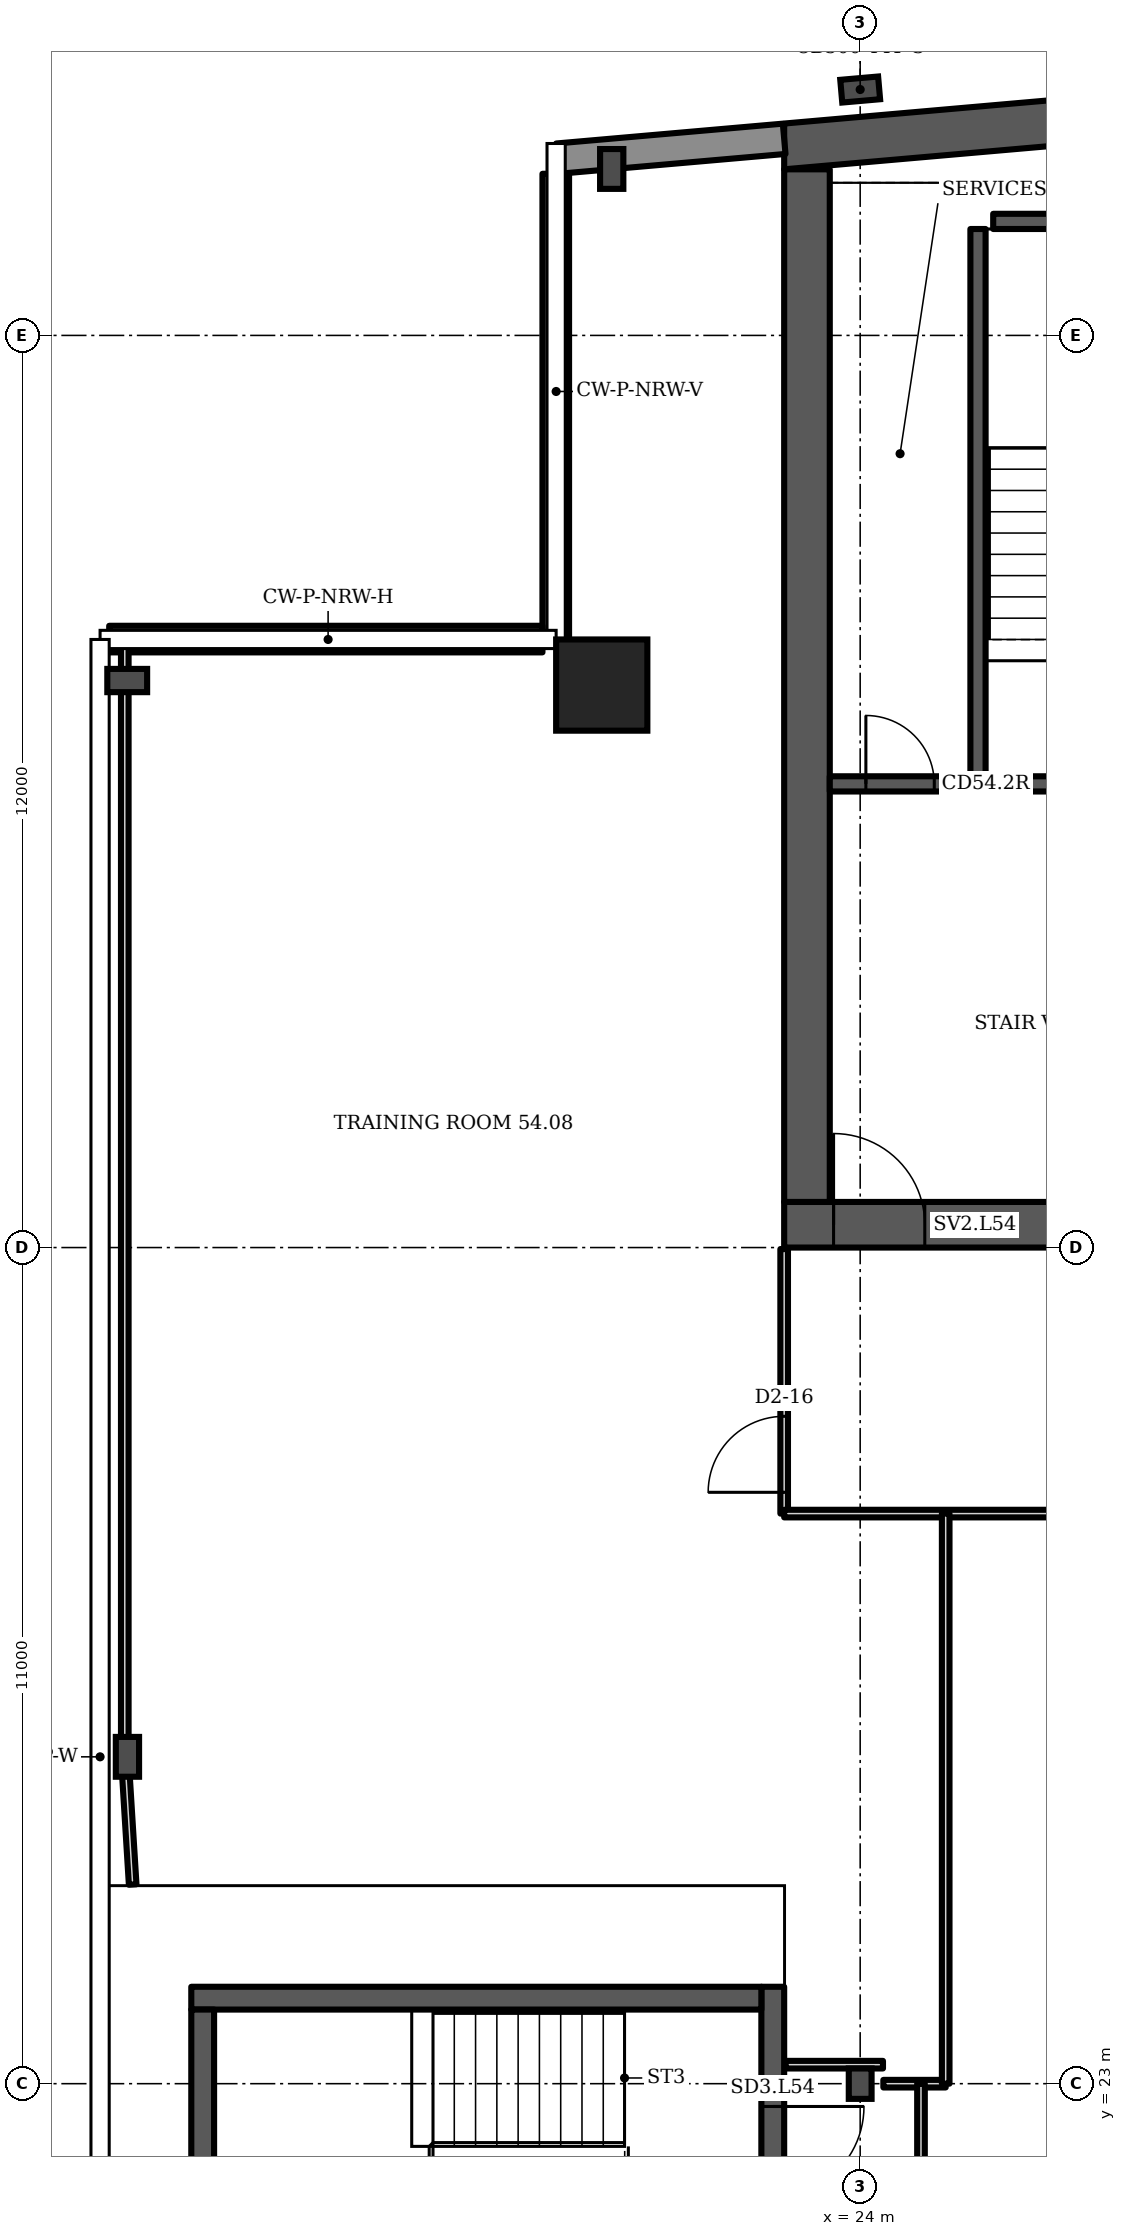
"""IFC4 building model, lengths in metres.
Left out: names, types, materials, properties, quantities, classifications, styles, units other than length and angle.
Written with IfcOpenShell. Run it as: python <this file> out.ifc"""

import sys

from ifc_helpers import new_model, si_unit, direction, frame, frame_2d, origin, origin_2d, place, context, subcontext, project, spatial, polyline, rectangle, i_section, outline, extrude, element, fill, save


model = new_model("IFC4")
c1 = context("Model", 3, precision=1e-05, world=origin(), true_north=direction((0.0, 1.0)))
c2 = subcontext(c1, "Body", "Model", "MODEL_VIEW")
j1 = project(units=[si_unit("LENGTHUNIT", "METRE"), si_unit("PLANEANGLEUNIT", "RADIAN")], contexts=[c1])
p1 = place(None, origin())
s1 = spatial("IfcSite", under=j1, at=p1, CompositionType="ELEMENT")
p2 = place(p1, origin())
s2 = spatial("IfcBuilding", under=s1, at=p2, CompositionType="ELEMENT")
p3 = place(p2, frame((0.0, 0.0, 217.9)))
s3 = spatial("IfcBuildingStorey", under=s2, at=p3, CompositionType="ELEMENT", Elevation=217.9)
p4 = place(p3, origin())
e1 = element("IfcWall", 1, at=p4, inside=s3, PredefinedType="SHEAR", context=c2, shape_type="SweptSolid", body=[
    extrude(outline(polyline([(23.0, 48.185), (40.5, 49.716), (58.0, 48.185), (58.0, 48.787), (40.5, 50.318), (23.0, 48.787), (23.0, 48.185)])), origin(), (0.0, 0.0, 1.0), 3.6),
])
p5 = place(p3, frame((23.0, 34.3, 0.0), z_axis=(0.0, 0.0, 1.0), x_axis=(1.0, 0.0, 0.0)))
e2 = element("IfcWall", 2, at=p5, inside=s3, PredefinedType="SHEAR", context=c2, shape_type="SweptSolid", body=[
    extrude(rectangle(XDim=35.0, YDim=0.6, at=frame_2d((17.5, 0.0))), origin(), (0.0, 0.0, 1.0), 3.6),
])
p6 = place(p5, frame((0.65, 0.0, 0.0)))
e3 = element("IfcOpeningElement", 3, at=p6, cuts=e2, PredefinedType="OPENING", context=c2, shape_type="SweptSolid", body=[
    extrude(rectangle(XDim=1.2, YDim=2.1, at=frame_2d((0.6, 1.05))), frame((0.0, 0.31, 0.0), z_axis=(0.0, -1.0, 0.0), x_axis=(1.0, 0.0, 0.0)), (0.0, 0.0, 1.0), 0.62),
])
p7 = place(p5, frame((7.717, 0.0, 0.0)))
e4 = element("IfcOpeningElement", 4, at=p7, cuts=e2, PredefinedType="OPENING", context=c2, shape_type="SweptSolid", body=[
    extrude(rectangle(XDim=1.1, YDim=2.1, at=frame_2d((0.55, 1.05))), frame((0.0, 0.31, 0.0), z_axis=(0.0, -1.0, 0.0), x_axis=(1.0, 0.0, 0.0)), (0.0, 0.0, 1.0), 0.62),
])
p8 = place(p5, frame((12.183, 0.0, 0.0)))
e5 = element("IfcOpeningElement", 5, at=p8, cuts=e2, PredefinedType="OPENING", context=c2, shape_type="SweptSolid", body=[
    extrude(rectangle(XDim=1.1, YDim=2.1, at=frame_2d((0.55, 1.05))), frame((0.0, 0.31, 0.0), z_axis=(0.0, -1.0, 0.0), x_axis=(1.0, 0.0, 0.0)), (0.0, 0.0, 1.0), 0.62),
])
p9 = place(p5, frame((9.8, 0.0, 0.0)))
e6 = element("IfcOpeningElement", 6, at=p9, cuts=e2, PredefinedType="OPENING", context=c2, shape_type="SweptSolid", body=[
    extrude(rectangle(XDim=1.4, YDim=2.1, at=frame_2d((0.7, 1.05))), frame((0.0, 0.31, 0.0), z_axis=(0.0, -1.0, 0.0), x_axis=(1.0, 0.0, 0.0)), (0.0, 0.0, 1.0), 0.62),
])
p10 = place(p5, frame((14.717, 0.0, 0.0)))
e7 = element("IfcOpeningElement", 7, at=p10, cuts=e2, PredefinedType="OPENING", context=c2, shape_type="SweptSolid", body=[
    extrude(rectangle(XDim=1.1, YDim=2.1, at=frame_2d((0.55, 1.05))), frame((0.0, 0.31, 0.0), z_axis=(0.0, -1.0, 0.0), x_axis=(1.0, 0.0, 0.0)), (0.0, 0.0, 1.0), 0.62),
])
p11 = place(p5, frame((16.95, 0.0, 0.0)))
e8 = element("IfcOpeningElement", 8, at=p11, cuts=e2, PredefinedType="OPENING", context=c2, shape_type="SweptSolid", body=[
    extrude(rectangle(XDim=1.1, YDim=2.1, at=frame_2d((0.55, 1.05))), frame((0.0, 0.31, 0.0), z_axis=(0.0, -1.0, 0.0), x_axis=(1.0, 0.0, 0.0)), (0.0, 0.0, 1.0), 0.62),
])
p12 = place(p5, frame((19.183, 0.0, 0.0)))
e9 = element("IfcOpeningElement", 9, at=p12, cuts=e2, PredefinedType="OPENING", context=c2, shape_type="SweptSolid", body=[
    extrude(rectangle(XDim=1.1, YDim=2.1, at=frame_2d((0.55, 1.05))), frame((0.0, 0.31, 0.0), z_axis=(0.0, -1.0, 0.0), x_axis=(1.0, 0.0, 0.0)), (0.0, 0.0, 1.0), 0.62),
])
p13 = place(p5, frame((26.15, 0.0, 0.0)))
e10 = element("IfcOpeningElement", 10, at=p13, cuts=e2, PredefinedType="OPENING", context=c2, shape_type="SweptSolid", body=[
    extrude(rectangle(XDim=1.2, YDim=2.1, at=frame_2d((0.6, 1.05))), frame((0.0, 0.31, 0.0), z_axis=(0.0, -1.0, 0.0), x_axis=(1.0, 0.0, 0.0)), (0.0, 0.0, 1.0), 0.62),
])
p14 = place(p5, frame((28.767, 0.0, 0.0)))
e11 = element("IfcOpeningElement", 11, at=p14, cuts=e2, PredefinedType="OPENING", context=c2, shape_type="SweptSolid", body=[
    extrude(rectangle(XDim=1.0, YDim=2.1, at=frame_2d((0.5, 1.05))), frame((0.0, 0.31, 0.0), z_axis=(0.0, -1.0, 0.0), x_axis=(1.0, 0.0, 0.0)), (0.0, 0.0, 1.0), 0.62),
])
p15 = place(p5, frame((33.083, 0.0, 0.0)))
e12 = element("IfcOpeningElement", 12, at=p15, cuts=e2, PredefinedType="OPENING", context=c2, shape_type="SweptSolid", body=[
    extrude(rectangle(XDim=1.0, YDim=2.1, at=frame_2d((0.5, 1.05))), frame((0.0, 0.31, 0.0), z_axis=(0.0, -1.0, 0.0), x_axis=(1.0, 0.0, 0.0)), (0.0, 0.0, 1.0), 0.62),
])
p16 = place(p5, frame((30.8, 0.0, 0.0)))
e13 = element("IfcOpeningElement", 13, at=p16, cuts=e2, PredefinedType="OPENING", context=c2, shape_type="SweptSolid", body=[
    extrude(rectangle(XDim=1.4, YDim=2.1, at=frame_2d((0.7, 1.05))), frame((0.0, 0.31, 0.0), z_axis=(0.0, -1.0, 0.0), x_axis=(1.0, 0.0, 0.0)), (0.0, 0.0, 1.0), 0.62),
])
p17 = place(p3, frame((23.3, 34.6, 0.0), z_axis=(0.0, 0.0, 1.0), x_axis=(0.0, 1.0, 0.0)))
e14 = element("IfcWall", 14, at=p17, inside=s3, PredefinedType="SHEAR", context=c2, shape_type="SweptSolid", body=[
    extrude(rectangle(XDim=13.585, YDim=0.6, at=frame_2d((6.792, 0.0))), origin(), (0.0, 0.0, 1.0), 3.6),
])
p18 = place(p3, frame((20.6, 41.4, 0.0), z_axis=(0.0, 0.0, 1.0), x_axis=(1.0, 0.0, 0.0)))
e15 = element("IfcColumn", 15, at=p18, inside=s3, PredefinedType="COLUMN", context=c2, shape_type="SweptSolid", body=[
    extrude(rectangle(XDim=1.2, YDim=1.2, at=origin_2d()), origin(), (0.0, 0.0, 1.0), 3.6),
])
for number, where, z_axis, x_axis in (
    (16, (20.731, 48.19, 0.0), (0.0, 0.0, 1.0), (-1.0, 0.0, 0.0)),
    (17, (14.357, 41.46, 0.0), (0.0, 0.0, 1.0), (0.0, 1.0, 0.0)),
    (18, (14.36, 27.3, 0.0), (0.0, 0.0, 1.0), (-1.0, 0.0, 0.0)),
):
    element("IfcColumn", number, at=place(p3, frame(where, z_axis=z_axis, x_axis=x_axis)), inside=s3, PredefinedType="COLUMN", context=c2, shape_type="SweptSolid", body=[
        extrude(i_section(OverallWidth=0.306, OverallDepth=0.524, WebThickness=0.021, FlangeThickness=0.04, FilletRadius=0.027, at=origin_2d()), origin(), (0.0, 0.0, 1.0), 3.6),
    ])
p19 = place(p3, frame((24.0, 23.0, 0.0), z_axis=(0.0, 0.0, 1.0), x_axis=(1.0, 0.0, 0.0)))
e19 = element("IfcColumn", 19, at=p19, inside=s3, PredefinedType="COLUMN", context=c2, shape_type="SweptSolid", body=[
    extrude(i_section(OverallWidth=0.3, OverallDepth=0.4, WebThickness=0.013, FlangeThickness=0.024, FilletRadius=0.027, at=origin_2d()), origin(), (0.0, 0.0, 1.0), 3.6),
])
p20 = place(p3, frame((24.0, 49.235, 0.0), z_axis=(0.0, 0.0, 1.0), x_axis=(-0.087156, 0.996197, 0.0)))
e20 = element("IfcColumn", 20, at=p20, inside=s3, PredefinedType="COLUMN", context=c2, shape_type="SweptSolid", body=[
    extrude(i_section(OverallWidth=0.3, OverallDepth=0.5, WebThickness=0.014, FlangeThickness=0.028, FilletRadius=0.027, at=origin_2d()), origin(), (0.0, 0.0, 1.0), 3.6),
])
p21 = place(p3, frame((23.0, 48.587, 0.0), z_axis=(0.0, 0.0, 1.0), x_axis=(-0.996194, -0.087168, 0.0)))
e21 = element("IfcWall", 21, at=p21, inside=s3, PredefinedType="SOLIDWALL", context=c2, shape_type="SweptSolid", body=[
    extrude(rectangle(XDim=2.994, YDim=0.4, at=frame_2d((1.497, 0.0))), origin(), (0.0, 0.0, 1.0), 3.2),
])
p22 = place(p3, frame((19.995, 48.126, 0.0), z_axis=(0.0, 0.0, 1.0), x_axis=(0.0, -1.0, 0.0)))
e22 = element("IfcWall", 22, at=p22, inside=s3, PredefinedType="SOLIDWALL", context=c2, shape_type="SweptSolid", body=[
    extrude(rectangle(XDim=6.126, YDim=0.35, at=frame_2d((3.063, 0.0))), origin(), (0.0, 0.0, 1.0), 1.0),
])
p23 = place(p3, frame((19.82, 42.005, 0.0), z_axis=(0.0, 0.0, 1.0), x_axis=(-1.0, 0.0, 0.0)))
e23 = element("IfcWall", 23, at=p23, inside=s3, PredefinedType="SOLIDWALL", context=c2, shape_type="SweptSolid", body=[
    extrude(rectangle(XDim=5.7, YDim=0.35, at=frame_2d((2.85, 0.0))), origin(), (0.0, 0.0, 1.0), 1.0),
])
p24 = place(p3, frame((23.6, 40.1, 0.0), z_axis=(0.0, 0.0, 1.0), x_axis=(1.0, 0.0, 0.0)))
e24 = element("IfcWall", 24, at=p24, inside=s3, PredefinedType="SHEAR", context=c2, shape_type="SweptSolid", body=[
    extrude(rectangle(XDim=6.1, YDim=0.2, at=frame_2d((3.05, 0.0))), origin(), (0.0, 0.0, 1.0), 3.2),
])
p25 = place(p24, frame((3.325, 0.0, 0.0)))
e25 = element("IfcOpeningElement", 25, at=p25, cuts=e24, PredefinedType="OPENING", context=c2, shape_type="SweptSolid", body=[
    extrude(rectangle(XDim=1.2, YDim=2.1, at=frame_2d((0.6, 1.05))), frame((0.0, 0.11, 0.0), z_axis=(0.0, -1.0, 0.0), x_axis=(1.0, 0.0, 0.0)), (0.0, 0.0, 1.0), 0.22),
])
p26 = place(p24, frame((0.475, 0.0, 0.0)))
e26 = element("IfcOpeningElement", 26, at=p26, cuts=e24, PredefinedType="OPENING", context=c2, shape_type="SweptSolid", body=[
    extrude(rectangle(XDim=0.9, YDim=2.1, at=frame_2d((0.45, 1.05))), frame((0.0, 0.11, 0.0), z_axis=(0.0, -1.0, 0.0), x_axis=(1.0, 0.0, 0.0)), (0.0, 0.0, 1.0), 0.22),
])
p27 = place(p3, frame((25.55, 40.2, 0.0), z_axis=(0.0, 0.0, 1.0), x_axis=(0.0, 1.0, 0.0)))
e27 = element("IfcWall", 27, at=p27, inside=s3, PredefinedType="SHEAR", context=c2, shape_type="SweptSolid", body=[
    extrude(rectangle(XDim=7.2, YDim=0.2, at=frame_2d((3.6, 0.0))), origin(), (0.0, 0.0, 1.0), 3.2),
])
p28 = place(p3, frame((25.75, 47.5, 0.0), z_axis=(0.0, 0.0, 1.0), x_axis=(1.0, 0.0, 0.0)))
e28 = element("IfcWall", 28, at=p28, inside=s3, PredefinedType="SHEAR", context=c2, shape_type="SweptSolid", body=[
    extrude(rectangle(XDim=3.95, YDim=0.2, at=frame_2d((1.975, 0.0))), origin(), (0.0, 0.0, 1.0), 3.2),
])
p29 = place(p3, frame((22.85, 19.925, 0.0), z_axis=(0.0, 0.0, 1.0), x_axis=(0.0, 1.0, 0.0)))
e29 = element("IfcWall", 29, at=p29, inside=s3, PredefinedType="SHEAR", context=c2, shape_type="SweptSolid", body=[
    extrude(rectangle(XDim=4.35, YDim=0.3, at=frame_2d((2.175, 0.0))), origin(), (0.0, 0.0, 1.0), 3.2),
])
p30 = place(p29, frame((1.575, 0.0, 0.0)))
e30 = element("IfcOpeningElement", 30, at=p30, cuts=e29, PredefinedType="OPENING", context=c2, shape_type="SweptSolid", body=[
    extrude(rectangle(XDim=1.2, YDim=2.1, at=frame_2d((0.6, 1.05))), frame((0.0, 0.16, 0.0), z_axis=(0.0, -1.0, 0.0), x_axis=(1.0, 0.0, 0.0)), (0.0, 0.0, 1.0), 0.32),
])
p31 = place(p3, frame((14.325, 27.3, 0.0), z_axis=(0.0, 0.0, 1.0), x_axis=(0.0, 1.0, 0.0)))
e31 = element("IfcWall", 31, at=p31, inside=s3, PredefinedType="PARTITIONING", context=c2, shape_type="SweptSolid", body=[
    extrude(rectangle(XDim=14.68, YDim=0.1, at=frame_2d((7.34, 0.0))), origin(), (0.0, 0.0, 1.0), 2.58),
])
p32 = place(p3, frame((14.429, 25.62, 0.0), z_axis=(0.0, 0.0, 1.0), x_axis=(-0.061647, 0.998101, 0.0)))
e32 = element("IfcWall", 32, at=p32, inside=s3, PredefinedType="PARTITIONING", context=c2, shape_type="SweptSolid", body=[
    extrude(rectangle(XDim=1.683, YDim=0.1, at=frame_2d((0.842, 0.0))), origin(), (0.0, 0.0, 1.0), 3.2),
])
p33 = place(p3, frame((23.0, 30.5, 0.0), z_axis=(0.0, 0.0, 1.0), x_axis=(0.0, 1.0, 0.0)))
e33 = element("IfcWall", 33, at=p33, inside=s3, PredefinedType="PARTITIONING", context=c2, shape_type="SweptSolid", body=[
    extrude(rectangle(XDim=3.48, YDim=0.1, at=frame_2d((1.74, 0.0))), origin(), (0.0, 0.0, 1.0), 3.2),
])
p34 = place(p33, frame((0.28, 0.0, 0.0)))
e34 = element("IfcOpeningElement", 34, at=p34, cuts=e33, PredefinedType="OPENING", context=c2, shape_type="SweptSolid", body=[
    extrude(rectangle(XDim=1.0, YDim=2.1, at=frame_2d((0.5, 1.05))), frame((0.0, 0.06, 0.0), z_axis=(0.0, -1.0, 0.0), x_axis=(1.0, 0.0, 0.0)), (0.0, 0.0, 1.0), 0.12),
])
p35 = place(p3, frame((23.0, 30.5, 0.0), z_axis=(0.0, 0.0, 1.0), x_axis=(1.0, 0.0, 0.0)))
e35 = element("IfcWall", 35, at=p35, inside=s3, PredefinedType="PARTITIONING", context=c2, shape_type="SweptSolid", body=[
    extrude(rectangle(XDim=13.85, YDim=0.1, at=frame_2d((6.925, 0.0))), origin(), (0.0, 0.0, 1.0), 3.2),
])
p36 = place(p35, frame((3.545, 0.0, 0.0)))
e36 = element("IfcOpeningElement", 36, at=p36, cuts=e35, PredefinedType="OPENING", context=c2, shape_type="SweptSolid", body=[
    extrude(rectangle(XDim=1.0, YDim=2.1, at=frame_2d((0.5, 1.05))), frame((0.0, 0.06, 0.0), z_axis=(0.0, -1.0, 0.0), x_axis=(1.0, 0.0, 0.0)), (0.0, 0.0, 1.0), 0.12),
])
p37 = place(p35, frame((11.545, 0.0, 0.0)))
e37 = element("IfcOpeningElement", 37, at=p37, cuts=e35, PredefinedType="OPENING", context=c2, shape_type="SweptSolid", body=[
    extrude(rectangle(XDim=1.0, YDim=2.1, at=frame_2d((0.5, 1.05))), frame((0.0, 0.06, 0.0), z_axis=(0.0, -1.0, 0.0), x_axis=(1.0, 0.0, 0.0)), (0.0, 0.0, 1.0), 0.12),
])
p38 = place(p3, frame((23.02, 23.25, 0.0), z_axis=(0.0, 0.0, 1.0), x_axis=(1.0, 0.0, 0.0)))
e38 = element("IfcWall", 38, at=p38, inside=s3, PredefinedType="PARTITIONING", context=c2, shape_type="SweptSolid", body=[
    extrude(rectangle(XDim=1.28, YDim=0.1, at=frame_2d((0.64, 0.0))), origin(), (0.0, 0.0, 1.0), 3.2),
])
p39 = place(p3, frame((24.305, 23.0, 0.0), z_axis=(0.0, 0.0, 1.0), x_axis=(1.0, 0.0, 0.0)))
e39 = element("IfcWall", 39, at=p39, inside=s3, PredefinedType="PARTITIONING", context=c2, shape_type="SweptSolid", body=[
    extrude(rectangle(XDim=0.82, YDim=0.1, at=frame_2d((0.41, 0.0))), origin(), (0.0, 0.0, 1.0), 3.2),
])
p40 = place(p3, frame((24.8, 19.2, 0.0), z_axis=(0.0, 0.0, 1.0), x_axis=(0.0, 1.0, 0.0)))
e40 = element("IfcWall", 40, at=p40, inside=s3, PredefinedType="PARTITIONING", context=c2, shape_type="SweptSolid", body=[
    extrude(rectangle(XDim=3.8, YDim=0.1, at=frame_2d((1.9, 0.0))), origin(), (0.0, 0.0, 1.0), 3.2),
])
p41 = place(p3, frame((25.125, 23.0, 0.0), z_axis=(0.0, 0.0, 1.0), x_axis=(0.0, 1.0, 0.0)))
e41 = element("IfcWall", 41, at=p41, inside=s3, PredefinedType="PARTITIONING", context=c2, shape_type="SweptSolid", body=[
    extrude(rectangle(XDim=7.5, YDim=0.1, at=frame_2d((3.75, 0.0))), origin(), (0.0, 0.0, 1.0), 3.2),
])
p42 = place(p3, frame((15.2, 24.125, 0.0), z_axis=(0.0, 0.0, 1.0), x_axis=(1.0, 0.0, 0.0)))
e42 = element("IfcWall", 42, at=p42, inside=s3, PredefinedType="SHEAR", context=c2, shape_type="SweptSolid", body=[
    extrude(rectangle(XDim=7.5, YDim=0.3, at=frame_2d((3.75, 0.0))), origin(), (0.0, 0.0, 1.0), 3.2),
])
p43 = place(p3, frame((15.35, 20.225, 0.0), z_axis=(0.0, 0.0, 1.0), x_axis=(0.0, 1.0, 0.0)))
e43 = element("IfcWall", 43, at=p43, inside=s3, PredefinedType="SHEAR", context=c2, shape_type="SweptSolid", body=[
    extrude(rectangle(XDim=3.75, YDim=0.3, at=frame_2d((1.875, 0.0))), origin(), (0.0, 0.0, 1.0), 3.2),
])
p44 = place(p26, origin())
e44 = element("IfcDoor", 44, at=p44, inside=s3, OperationType="SINGLE_SWING_LEFT", PredefinedType="DOOR", context=c2, shape_type="SweptSolid", body=[
    extrude(rectangle(XDim=0.9, YDim=2.1, at=frame_2d((0.45, 1.05))), frame((0.0, 0.025, 0.0), z_axis=(0.0, -1.0, 0.0), x_axis=(1.0, 0.0, 0.0)), (0.0, 0.0, 1.0), 0.05),
])
fill(e26, e44)
p45 = place(p6, origin())
e45 = element("IfcDoor", 45, at=p45, inside=s3, OperationType="SINGLE_SWING_LEFT", PredefinedType="DOOR", context=c2, shape_type="SweptSolid", body=[
    extrude(rectangle(XDim=1.2, YDim=2.1, at=frame_2d((0.6, 1.05))), frame((0.0, 0.025, 0.0), z_axis=(0.0, -1.0, 0.0), x_axis=(1.0, 0.0, 0.0)), (0.0, 0.0, 1.0), 0.05),
])
fill(e3, e45)
p46 = place(p30, origin())
e46 = element("IfcDoor", 46, at=p46, inside=s3, OperationType="SINGLE_SWING_RIGHT", PredefinedType="DOOR", context=c2, shape_type="SweptSolid", body=[
    extrude(rectangle(XDim=1.2, YDim=2.1, at=frame_2d((0.6, 1.05))), frame((0.0, 0.025, 0.0), z_axis=(0.0, -1.0, 0.0), x_axis=(1.0, 0.0, 0.0)), (0.0, 0.0, 1.0), 0.05),
])
fill(e30, e46)
p47 = place(p34, origin())
e47 = element("IfcDoor", 47, at=p47, inside=s3, OperationType="SINGLE_SWING_LEFT", PredefinedType="DOOR", context=c2, shape_type="SweptSolid", body=[
    extrude(rectangle(XDim=1.0, YDim=2.1, at=frame_2d((0.5, 1.05))), frame((0.0, 0.025, 0.0), z_axis=(0.0, -1.0, 0.0), x_axis=(1.0, 0.0, 0.0)), (0.0, 0.0, 1.0), 0.05),
])
fill(e34, e47)
save(model, sys.argv[1])
